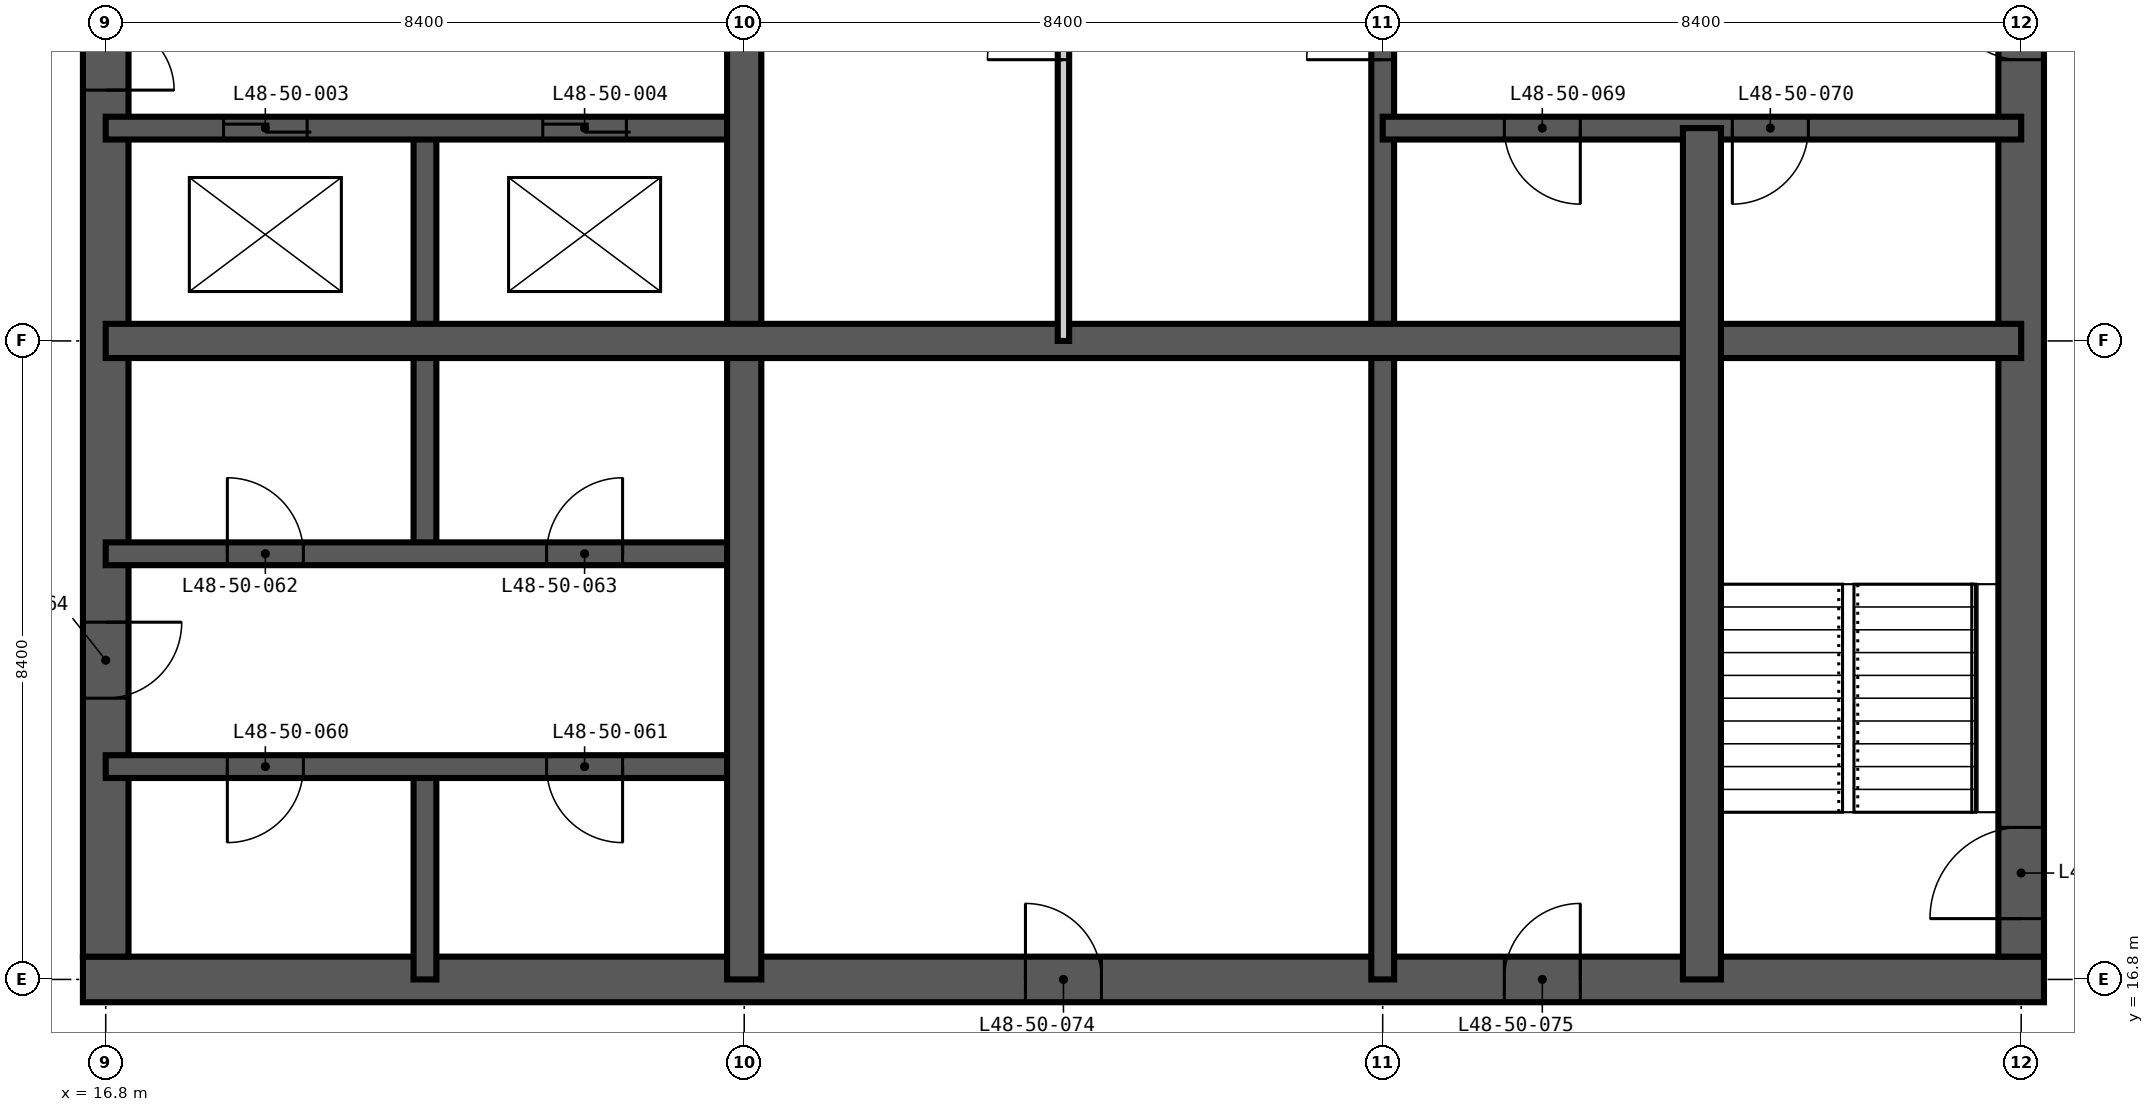
"""IFC4 building model, lengths in metres.
Left out: names, types, materials, properties, quantities, classifications, styles, units other than length and angle.
Written with IfcOpenShell. Run it as: python <this file> out.ifc"""

import sys

from ifc_helpers import new_model, si_unit, direction, frame, frame_2d, origin, place, context, subcontext, project, spatial, rectangle, extrude, element, fill, save


model = new_model("IFC4")
c1 = context("Model", 3, precision=1e-05, world=origin(), true_north=direction((0.0, 1.0)))
c2 = subcontext(c1, "Body", "Model", "MODEL_VIEW")
j1 = project(units=[si_unit("LENGTHUNIT", "METRE"), si_unit("PLANEANGLEUNIT", "RADIAN")], contexts=[c1])
p1 = place(None, origin())
s1 = spatial("IfcSite", under=j1, at=p1, CompositionType="ELEMENT")
p2 = place(p1, origin())
s2 = spatial("IfcBuilding", under=s1, at=p2, CompositionType="ELEMENT")
p3 = place(p2, frame((0.0, 0.0, 187.8)))
s3 = spatial("IfcBuildingStorey", under=s2, at=p3, CompositionType="ELEMENT", Elevation=187.8)
p4 = place(p3, frame((16.5, 16.8, -0.35), z_axis=(0.0, 0.0, 1.0), x_axis=(1.0, 0.0, 0.0)))
e1 = element("IfcWall", 1, at=p4, inside=s3, PredefinedType="SHEAR", context=c2, shape_type="SweptSolid", body=[
    extrude(rectangle(XDim=25.8, YDim=0.6, at=frame_2d((12.9, 0.0))), origin(), (0.0, 0.0, 1.0), 3.6),
])
p5 = place(p4, frame((12.4, 0.0, 0.35)))
e2 = element("IfcOpeningElement", 2, at=p5, cuts=e1, PredefinedType="OPENING", context=c2, shape_type="SweptSolid", body=[
    extrude(rectangle(XDim=1.0, YDim=2.1, at=frame_2d((0.5, 1.05))), frame((0.0, 0.31, 0.0), z_axis=(0.0, -1.0, 0.0), x_axis=(1.0, 0.0, 0.0)), (0.0, 0.0, 1.0), 0.62),
])
p6 = place(p4, frame((18.7, 0.0, 0.35)))
e3 = element("IfcOpeningElement", 3, at=p6, cuts=e1, PredefinedType="OPENING", context=c2, shape_type="SweptSolid", body=[
    extrude(rectangle(XDim=1.0, YDim=2.1, at=frame_2d((0.5, 1.05))), frame((0.0, 0.31, 0.0), z_axis=(0.0, -1.0, 0.0), x_axis=(1.0, 0.0, 0.0)), (0.0, 0.0, 1.0), 0.62),
])
p7 = place(p3, frame((42.0, 17.1, -0.35), z_axis=(0.0, 0.0, 1.0), x_axis=(0.0, 1.0, 0.0)))
e4 = element("IfcWall", 4, at=p7, inside=s3, PredefinedType="SHEAR", context=c2, shape_type="SweptSolid", body=[
    extrude(rectangle(XDim=24.6, YDim=0.6, at=frame_2d((12.3, 0.0))), origin(), (0.0, 0.0, 1.0), 3.6),
])
p8 = place(p7, frame((0.5, 0.0, 0.35)))
e5 = element("IfcOpeningElement", 5, at=p8, cuts=e4, PredefinedType="OPENING", context=c2, shape_type="SweptSolid", body=[
    extrude(rectangle(XDim=1.2, YDim=2.2, at=frame_2d((0.6, 1.1))), frame((0.0, 0.31, 0.0), z_axis=(0.0, -1.0, 0.0), x_axis=(1.0, 0.0, 0.0)), (0.0, 0.0, 1.0), 0.62),
])
p9 = place(p7, frame((11.8, 0.0, 0.35)))
e6 = element("IfcOpeningElement", 6, at=p9, cuts=e4, PredefinedType="OPENING", context=c2, shape_type="SweptSolid", body=[
    extrude(rectangle(XDim=1.0, YDim=2.1, at=frame_2d((0.5, 1.05))), frame((0.0, 0.31, 0.0), z_axis=(0.0, -1.0, 0.0), x_axis=(1.0, 0.0, 0.0)), (0.0, 0.0, 1.0), 0.62),
])
p10 = place(p7, frame((20.2, 0.0, 0.35)))
e7 = element("IfcOpeningElement", 7, at=p10, cuts=e4, PredefinedType="OPENING", context=c2, shape_type="SweptSolid", body=[
    extrude(rectangle(XDim=1.0, YDim=2.1, at=frame_2d((0.5, 1.05))), frame((0.0, 0.31, 0.0), z_axis=(0.0, -1.0, 0.0), x_axis=(1.0, 0.0, 0.0)), (0.0, 0.0, 1.0), 0.62),
])
p11 = place(p3, frame((16.8, 41.7, -0.35), z_axis=(0.0, 0.0, 1.0), x_axis=(0.0, -1.0, 0.0)))
e8 = element("IfcWall", 8, at=p11, inside=s3, PredefinedType="SHEAR", context=c2, shape_type="SweptSolid", body=[
    extrude(rectangle(XDim=24.6, YDim=0.6, at=frame_2d((12.3, 0.0))), origin(), (0.0, 0.0, 1.0), 3.6),
])
p12 = place(p11, frame((11.4, 0.0, 0.35)))
e9 = element("IfcOpeningElement", 9, at=p12, cuts=e8, PredefinedType="OPENING", context=c2, shape_type="SweptSolid", body=[
    extrude(rectangle(XDim=1.8, YDim=2.2, at=frame_2d((0.9, 1.1))), frame((0.0, 0.31, 0.0), z_axis=(0.0, -1.0, 0.0), x_axis=(1.0, 0.0, 0.0)), (0.0, 0.0, 1.0), 0.62),
])
p13 = place(p11, frame((20.2, 0.0, 0.35)))
e10 = element("IfcOpeningElement", 10, at=p13, cuts=e8, PredefinedType="OPENING", context=c2, shape_type="SweptSolid", body=[
    extrude(rectangle(XDim=1.0, YDim=2.1, at=frame_2d((0.5, 1.05))), frame((0.0, 0.31, 0.0), z_axis=(0.0, -1.0, 0.0), x_axis=(1.0, 0.0, 0.0)), (0.0, 0.0, 1.0), 0.62),
])
p14 = place(p11, frame((5.5, 0.0, 0.35)))
e11 = element("IfcOpeningElement", 11, at=p14, cuts=e8, PredefinedType="OPENING", context=c2, shape_type="SweptSolid", body=[
    extrude(rectangle(XDim=1.0, YDim=2.1, at=frame_2d((0.5, 1.05))), frame((0.0, 0.31, 0.0), z_axis=(0.0, -1.0, 0.0), x_axis=(1.0, 0.0, 0.0)), (0.0, 0.0, 1.0), 0.62),
])
p15 = place(p3, frame((21.0, 16.8, -0.35), z_axis=(0.0, 0.0, 1.0), x_axis=(0.0, 1.0, 0.0)))
e12 = element("IfcWall", 12, at=p15, inside=s3, PredefinedType="SHEAR", context=c2, shape_type="SweptSolid", body=[
    extrude(rectangle(XDim=2.8, YDim=0.3, at=frame_2d((1.4, 0.0))), origin(), (0.0, 0.0, 1.0), 3.6),
])
p16 = place(p3, frame((21.0, 22.4, -0.35), z_axis=(0.0, 0.0, 1.0), x_axis=(0.0, 1.0, 0.0)))
e13 = element("IfcWall", 13, at=p16, inside=s3, PredefinedType="SHEAR", context=c2, shape_type="SweptSolid", body=[
    extrude(rectangle(XDim=5.6, YDim=0.3, at=frame_2d((2.8, 0.0))), origin(), (0.0, 0.0, 1.0), 3.6),
])
p17 = place(p3, frame((33.6, 16.8, -0.35), z_axis=(0.0, 0.0, 1.0), x_axis=(0.0, 1.0, 0.0)))
e14 = element("IfcWall", 14, at=p17, inside=s3, PredefinedType="SHEAR", context=c2, shape_type="SweptSolid", body=[
    extrude(rectangle(XDim=25.2, YDim=0.3, at=frame_2d((12.6, 0.0))), origin(), (0.0, 0.0, 1.0), 3.6),
])
p18 = place(p17, frame((22.5, 0.0, 0.35)))
e15 = element("IfcOpeningElement", 15, at=p18, cuts=e14, PredefinedType="OPENING", context=c2, shape_type="SweptSolid", body=[
    extrude(rectangle(XDim=1.2, YDim=2.2, at=frame_2d((0.6, 1.1))), frame((0.0, 0.16, 0.0), z_axis=(0.0, -1.0, 0.0), x_axis=(1.0, 0.0, 0.0)), (0.0, 0.0, 1.0), 0.32),
])
p19 = place(p17, frame((18.3, 0.0, 0.35)))
e16 = element("IfcOpeningElement", 16, at=p19, cuts=e14, PredefinedType="OPENING", context=c2, shape_type="SweptSolid", body=[
    extrude(rectangle(XDim=1.2, YDim=2.2, at=frame_2d((0.6, 1.1))), frame((0.0, 0.16, 0.0), z_axis=(0.0, -1.0, 0.0), x_axis=(1.0, 0.0, 0.0)), (0.0, 0.0, 1.0), 0.32),
])
p20 = place(p17, frame((12.1, 0.0, 0.35)))
e17 = element("IfcOpeningElement", 17, at=p20, cuts=e14, PredefinedType="OPENING", context=c2, shape_type="SweptSolid", body=[
    extrude(rectangle(XDim=1.0, YDim=2.1, at=frame_2d((0.5, 1.05))), frame((0.0, 0.16, 0.0), z_axis=(0.0, -1.0, 0.0), x_axis=(1.0, 0.0, 0.0)), (0.0, 0.0, 1.0), 0.32),
])
p21 = place(p3, frame((16.8, 19.6, -0.35), z_axis=(0.0, 0.0, 1.0), x_axis=(1.0, 0.0, 0.0)))
e18 = element("IfcWall", 18, at=p21, inside=s3, PredefinedType="SHEAR", context=c2, shape_type="SweptSolid", body=[
    extrude(rectangle(XDim=8.4, YDim=0.3, at=frame_2d((4.2, 0.0))), origin(), (0.0, 0.0, 1.0), 3.6),
])
p22 = place(p21, frame((1.6, 0.0, 0.35)))
e19 = element("IfcOpeningElement", 19, at=p22, cuts=e18, PredefinedType="OPENING", context=c2, shape_type="SweptSolid", body=[
    extrude(rectangle(XDim=1.0, YDim=2.1, at=frame_2d((0.5, 1.05))), frame((0.0, 0.16, 0.0), z_axis=(0.0, -1.0, 0.0), x_axis=(1.0, 0.0, 0.0)), (0.0, 0.0, 1.0), 0.32),
])
p23 = place(p21, frame((5.8, 0.0, 0.35)))
e20 = element("IfcOpeningElement", 20, at=p23, cuts=e18, PredefinedType="OPENING", context=c2, shape_type="SweptSolid", body=[
    extrude(rectangle(XDim=1.0, YDim=2.1, at=frame_2d((0.5, 1.05))), frame((0.0, 0.16, 0.0), z_axis=(0.0, -1.0, 0.0), x_axis=(1.0, 0.0, 0.0)), (0.0, 0.0, 1.0), 0.32),
])
p24 = place(p3, frame((16.8, 22.4, -0.35), z_axis=(0.0, 0.0, 1.0), x_axis=(1.0, 0.0, 0.0)))
e21 = element("IfcWall", 21, at=p24, inside=s3, PredefinedType="SHEAR", context=c2, shape_type="SweptSolid", body=[
    extrude(rectangle(XDim=8.4, YDim=0.3, at=frame_2d((4.2, 0.0))), origin(), (0.0, 0.0, 1.0), 3.6),
])
p25 = place(p24, frame((1.6, 0.0, 0.35)))
e22 = element("IfcOpeningElement", 22, at=p25, cuts=e21, PredefinedType="OPENING", context=c2, shape_type="SweptSolid", body=[
    extrude(rectangle(XDim=1.0, YDim=2.1, at=frame_2d((0.5, 1.05))), frame((0.0, 0.16, 0.0), z_axis=(0.0, -1.0, 0.0), x_axis=(1.0, 0.0, 0.0)), (0.0, 0.0, 1.0), 0.32),
])
p26 = place(p24, frame((5.8, 0.0, 0.35)))
e23 = element("IfcOpeningElement", 23, at=p26, cuts=e21, PredefinedType="OPENING", context=c2, shape_type="SweptSolid", body=[
    extrude(rectangle(XDim=1.0, YDim=2.1, at=frame_2d((0.5, 1.05))), frame((0.0, 0.16, 0.0), z_axis=(0.0, -1.0, 0.0), x_axis=(1.0, 0.0, 0.0)), (0.0, 0.0, 1.0), 0.32),
])
p27 = place(p3, frame((16.8, 28.0, -0.35), z_axis=(0.0, 0.0, 1.0), x_axis=(1.0, 0.0, 0.0)))
e24 = element("IfcWall", 24, at=p27, inside=s3, PredefinedType="SHEAR", context=c2, shape_type="SweptSolid", body=[
    extrude(rectangle(XDim=8.4, YDim=0.3, at=frame_2d((4.2, 0.0))), origin(), (0.0, 0.0, 1.0), 3.6),
])
p28 = place(p27, frame((1.55, 0.0, 0.35)))
e25 = element("IfcOpeningElement", 25, at=p28, cuts=e24, PredefinedType="OPENING", context=c2, shape_type="SweptSolid", body=[
    extrude(rectangle(XDim=1.1, YDim=2.2, at=frame_2d((0.55, 1.1))), frame((0.0, 0.16, 0.0), z_axis=(0.0, -1.0, 0.0), x_axis=(1.0, 0.0, 0.0)), (0.0, 0.0, 1.0), 0.32),
])
p29 = place(p27, frame((5.75, 0.0, 0.35)))
e26 = element("IfcOpeningElement", 26, at=p29, cuts=e24, PredefinedType="OPENING", context=c2, shape_type="SweptSolid", body=[
    extrude(rectangle(XDim=1.1, YDim=2.2, at=frame_2d((0.55, 1.1))), frame((0.0, 0.16, 0.0), z_axis=(0.0, -1.0, 0.0), x_axis=(1.0, 0.0, 0.0)), (0.0, 0.0, 1.0), 0.32),
])
p30 = place(p3, frame((33.6, 28.0, -0.35), z_axis=(0.0, 0.0, 1.0), x_axis=(1.0, 0.0, 0.0)))
e27 = element("IfcWall", 27, at=p30, inside=s3, PredefinedType="SHEAR", context=c2, shape_type="SweptSolid", body=[
    extrude(rectangle(XDim=8.4, YDim=0.3, at=frame_2d((4.2, 0.0))), origin(), (0.0, 0.0, 1.0), 3.6),
])
p31 = place(p30, frame((1.6, 0.0, 0.35)))
e28 = element("IfcOpeningElement", 28, at=p31, cuts=e27, PredefinedType="OPENING", context=c2, shape_type="SweptSolid", body=[
    extrude(rectangle(XDim=1.0, YDim=2.1, at=frame_2d((0.5, 1.05))), frame((0.0, 0.16, 0.0), z_axis=(0.0, -1.0, 0.0), x_axis=(1.0, 0.0, 0.0)), (0.0, 0.0, 1.0), 0.32),
])
p32 = place(p30, frame((4.6, 0.0, 0.35)))
e29 = element("IfcOpeningElement", 29, at=p32, cuts=e27, PredefinedType="OPENING", context=c2, shape_type="SweptSolid", body=[
    extrude(rectangle(XDim=1.0, YDim=2.1, at=frame_2d((0.5, 1.05))), frame((0.0, 0.16, 0.0), z_axis=(0.0, -1.0, 0.0), x_axis=(1.0, 0.0, 0.0)), (0.0, 0.0, 1.0), 0.32),
])
for number, where, z_axis, x_axis in (
    (30, (25.2, 16.8, -0.35), (0.0, 0.0, 1.0), (0.0, 1.0, 0.0)),
    (31, (16.8, 25.2, -0.35), (0.0, 0.0, 1.0), (1.0, 0.0, 0.0)),
):
    element("IfcWall", number, at=place(p3, frame(where, z_axis=z_axis, x_axis=x_axis)), inside=s3, PredefinedType="SHEAR", context=c2, shape_type="SweptSolid", body=[
        extrude(rectangle(XDim=25.2, YDim=0.45, at=frame_2d((12.6, 0.0))), origin(), (0.0, 0.0, 1.0), 3.6),
    ])
p33 = place(p3, frame((37.8, 16.8, -0.35), z_axis=(0.0, 0.0, 1.0), x_axis=(0.0, 1.0, 0.0)))
e32 = element("IfcWall", 32, at=p33, inside=s3, PredefinedType="SHEAR", context=c2, shape_type="SweptSolid", body=[
    extrude(rectangle(XDim=11.2, YDim=0.5, at=frame_2d((5.6, 0.0))), origin(), (0.0, 0.0, 1.0), 3.6),
])
p34 = place(p3, frame((29.4, 25.2, 0.0), z_axis=(0.0, 0.0, 1.0), x_axis=(0.0, 1.0, 0.0)))
e33 = element("IfcWall", 33, at=p34, inside=s3, PredefinedType="PARTITIONING", context=c2, shape_type="SweptSolid", body=[
    extrude(rectangle(XDim=8.4, YDim=0.15, at=frame_2d((4.2, 0.0))), origin(), (0.0, 0.0, 1.0), 3.25),
])
p35 = place(p34, frame((3.7, 0.0, 0.0)))
e34 = element("IfcOpeningElement", 34, at=p35, cuts=e33, PredefinedType="OPENING", context=c2, shape_type="SweptSolid", body=[
    extrude(rectangle(XDim=1.0, YDim=2.1, at=frame_2d((0.5, 1.05))), frame((0.0, 0.085, 0.0), z_axis=(0.0, -1.0, 0.0), x_axis=(1.0, 0.0, 0.0)), (0.0, 0.0, 1.0), 0.17),
])
p36 = place(p8, origin())
e35 = element("IfcDoor", 35, at=p36, inside=s3, OperationType="SINGLE_SWING_LEFT", PredefinedType="DOOR", context=c2, shape_type="SweptSolid", body=[
    extrude(rectangle(XDim=1.2, YDim=2.2, at=frame_2d((0.6, 1.1))), frame((0.0, 0.025, 0.0), z_axis=(0.0, -1.0, 0.0), x_axis=(1.0, 0.0, 0.0)), (0.0, 0.0, 1.0), 0.05),
])
fill(e5, e35)
p37 = place(p28, origin())
e36 = element("IfcDoor", 36, at=p37, inside=s3, OperationType="DOUBLE_DOOR_SLIDING", PredefinedType="DOOR", context=c2, shape_type="SweptSolid", body=[
    extrude(rectangle(XDim=1.1, YDim=2.2, at=frame_2d((0.55, 1.1))), frame((0.0, 0.025, 0.0), z_axis=(0.0, -1.0, 0.0), x_axis=(1.0, 0.0, 0.0)), (0.0, 0.0, 1.0), 0.05),
])
fill(e25, e36)
p38 = place(p29, origin())
e37 = element("IfcDoor", 37, at=p38, inside=s3, OperationType="DOUBLE_DOOR_SLIDING", PredefinedType="DOOR", context=c2, shape_type="SweptSolid", body=[
    extrude(rectangle(XDim=1.1, YDim=2.2, at=frame_2d((0.55, 1.1))), frame((0.0, 0.025, 0.0), z_axis=(0.0, -1.0, 0.0), x_axis=(1.0, 0.0, 0.0)), (0.0, 0.0, 1.0), 0.05),
])
fill(e26, e37)
p39 = place(p12, origin())
e38 = element("IfcDoor", 38, at=p39, inside=s3, OperationType="DOUBLE_DOOR_DOUBLE_SWING", PredefinedType="DOOR", context=c2, shape_type="SweptSolid", body=[
    extrude(rectangle(XDim=1.8, YDim=2.2, at=frame_2d((0.9, 1.1))), frame((0.0, 0.025, 0.0), z_axis=(0.0, -1.0, 0.0), x_axis=(1.0, 0.0, 0.0)), (0.0, 0.0, 1.0), 0.05),
])
fill(e9, e38)
p40 = place(p22, frame((1.0, 0.0, 0.0), z_axis=(0.0, 0.0, 1.0), x_axis=(-1.0, 0.0, 0.0)))
e39 = element("IfcDoor", 39, at=p40, inside=s3, OperationType="SINGLE_SWING_RIGHT", PredefinedType="DOOR", context=c2, shape_type="SweptSolid", body=[
    extrude(rectangle(XDim=1.0, YDim=2.1, at=frame_2d((0.5, 1.05))), frame((0.0, 0.025, 0.0), z_axis=(0.0, -1.0, 0.0), x_axis=(1.0, 0.0, 0.0)), (0.0, 0.0, 1.0), 0.05),
])
fill(e19, e39)
p41 = place(p23, frame((1.0, 0.0, 0.0), z_axis=(0.0, 0.0, 1.0), x_axis=(-1.0, 0.0, 0.0)))
e40 = element("IfcDoor", 40, at=p41, inside=s3, OperationType="SINGLE_SWING_LEFT", PredefinedType="DOOR", context=c2, shape_type="SweptSolid", body=[
    extrude(rectangle(XDim=1.0, YDim=2.1, at=frame_2d((0.5, 1.05))), frame((0.0, 0.025, 0.0), z_axis=(0.0, -1.0, 0.0), x_axis=(1.0, 0.0, 0.0)), (0.0, 0.0, 1.0), 0.05),
])
fill(e20, e40)
p42 = place(p25, origin())
e41 = element("IfcDoor", 41, at=p42, inside=s3, OperationType="SINGLE_SWING_LEFT", PredefinedType="DOOR", context=c2, shape_type="SweptSolid", body=[
    extrude(rectangle(XDim=1.0, YDim=2.1, at=frame_2d((0.5, 1.05))), frame((0.0, 0.025, 0.0), z_axis=(0.0, -1.0, 0.0), x_axis=(1.0, 0.0, 0.0)), (0.0, 0.0, 1.0), 0.05),
])
fill(e22, e41)
p43 = place(p26, origin())
e42 = element("IfcDoor", 42, at=p43, inside=s3, OperationType="SINGLE_SWING_RIGHT", PredefinedType="DOOR", context=c2, shape_type="SweptSolid", body=[
    extrude(rectangle(XDim=1.0, YDim=2.1, at=frame_2d((0.5, 1.05))), frame((0.0, 0.025, 0.0), z_axis=(0.0, -1.0, 0.0), x_axis=(1.0, 0.0, 0.0)), (0.0, 0.0, 1.0), 0.05),
])
fill(e23, e42)
p44 = place(p13, origin())
e43 = element("IfcDoor", 43, at=p44, inside=s3, OperationType="SINGLE_SWING_LEFT", PredefinedType="DOOR", context=c2, shape_type="SweptSolid", body=[
    extrude(rectangle(XDim=1.0, YDim=2.1, at=frame_2d((0.5, 1.05))), frame((0.0, 0.025, 0.0), z_axis=(0.0, -1.0, 0.0), x_axis=(1.0, 0.0, 0.0)), (0.0, 0.0, 1.0), 0.05),
])
fill(e10, e43)
p45 = place(p20, origin())
e44 = element("IfcDoor", 44, at=p45, inside=s3, OperationType="SINGLE_SWING_LEFT", PredefinedType="DOOR", context=c2, shape_type="SweptSolid", body=[
    extrude(rectangle(XDim=1.0, YDim=2.1, at=frame_2d((0.5, 1.05))), frame((0.0, 0.025, 0.0), z_axis=(0.0, -1.0, 0.0), x_axis=(1.0, 0.0, 0.0)), (0.0, 0.0, 1.0), 0.05),
])
fill(e17, e44)
p46 = place(p35, origin())
e45 = element("IfcDoor", 45, at=p46, inside=s3, OperationType="SINGLE_SWING_LEFT", PredefinedType="DOOR", context=c2, shape_type="SweptSolid", body=[
    extrude(rectangle(XDim=1.0, YDim=2.1, at=frame_2d((0.5, 1.05))), frame((0.0, 0.025, 0.0), z_axis=(0.0, -1.0, 0.0), x_axis=(1.0, 0.0, 0.0)), (0.0, 0.0, 1.0), 0.05),
])
fill(e34, e45)
p47 = place(p31, frame((1.0, 0.0, 0.0), z_axis=(0.0, 0.0, 1.0), x_axis=(-1.0, 0.0, 0.0)))
e46 = element("IfcDoor", 46, at=p47, inside=s3, OperationType="SINGLE_SWING_LEFT", PredefinedType="DOOR", context=c2, shape_type="SweptSolid", body=[
    extrude(rectangle(XDim=1.0, YDim=2.1, at=frame_2d((0.5, 1.05))), frame((0.0, 0.025, 0.0), z_axis=(0.0, -1.0, 0.0), x_axis=(1.0, 0.0, 0.0)), (0.0, 0.0, 1.0), 0.05),
])
fill(e28, e46)
p48 = place(p32, frame((1.0, 0.0, 0.0), z_axis=(0.0, 0.0, 1.0), x_axis=(-1.0, 0.0, 0.0)))
e47 = element("IfcDoor", 47, at=p48, inside=s3, OperationType="SINGLE_SWING_RIGHT", PredefinedType="DOOR", context=c2, shape_type="SweptSolid", body=[
    extrude(rectangle(XDim=1.0, YDim=2.1, at=frame_2d((0.5, 1.05))), frame((0.0, 0.025, 0.0), z_axis=(0.0, -1.0, 0.0), x_axis=(1.0, 0.0, 0.0)), (0.0, 0.0, 1.0), 0.05),
])
fill(e29, e47)
p49 = place(p9, origin())
e48 = element("IfcDoor", 48, at=p49, inside=s3, OperationType="SINGLE_SWING_RIGHT", PredefinedType="DOOR", context=c2, shape_type="SweptSolid", body=[
    extrude(rectangle(XDim=1.0, YDim=2.1, at=frame_2d((0.5, 1.05))), frame((0.0, 0.025, 0.0), z_axis=(0.0, -1.0, 0.0), x_axis=(1.0, 0.0, 0.0)), (0.0, 0.0, 1.0), 0.05),
])
fill(e6, e48)
p50 = place(p5, origin())
e49 = element("IfcDoor", 49, at=p50, inside=s3, OperationType="SINGLE_SWING_LEFT", PredefinedType="DOOR", context=c2, shape_type="SweptSolid", body=[
    extrude(rectangle(XDim=1.0, YDim=2.1, at=frame_2d((0.5, 1.05))), frame((0.0, 0.025, 0.0), z_axis=(0.0, -1.0, 0.0), x_axis=(1.0, 0.0, 0.0)), (0.0, 0.0, 1.0), 0.05),
])
fill(e2, e49)
p51 = place(p6, origin())
e50 = element("IfcDoor", 50, at=p51, inside=s3, OperationType="SINGLE_SWING_RIGHT", PredefinedType="DOOR", context=c2, shape_type="SweptSolid", body=[
    extrude(rectangle(XDim=1.0, YDim=2.1, at=frame_2d((0.5, 1.05))), frame((0.0, 0.025, 0.0), z_axis=(0.0, -1.0, 0.0), x_axis=(1.0, 0.0, 0.0)), (0.0, 0.0, 1.0), 0.05),
])
fill(e3, e50)
save(model, sys.argv[1])
